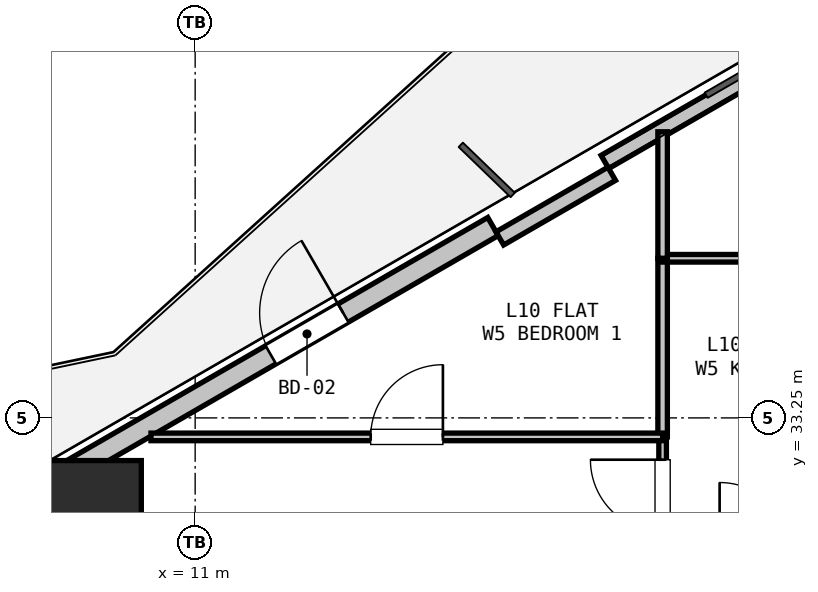
"""IFC4 building model, lengths in metres.
Left out: names, types, materials, properties, quantities, classifications, styles, units other than length and angle.
Written with IfcOpenShell. Run it as: python <this file> out.ifc"""

import sys

from ifc_helpers import new_model, si_unit, direction, frame, frame_2d, origin, origin_2d, place, context, subcontext, project, spatial, rectangle, hollow_rectangle, extrude, element, fill, save


model = new_model("IFC4")
c1 = context("Model", 3, precision=1e-05, world=origin(), true_north=direction((0.0, 1.0)))
c2 = subcontext(c1, "Body", "Model", "MODEL_VIEW")
j1 = project(units=[si_unit("LENGTHUNIT", "METRE"), si_unit("PLANEANGLEUNIT", "RADIAN")], contexts=[c1])
p1 = place(None, origin())
s1 = spatial("IfcSite", under=j1, at=p1, CompositionType="ELEMENT")
p2 = place(p1, origin())
s2 = spatial("IfcBuilding", under=s1, at=p2, CompositionType="ELEMENT")
p3 = place(p2, frame((0.0, 0.0, 39.0)))
s3 = spatial("IfcBuildingStorey", under=s2, at=p3, CompositionType="ELEMENT", Elevation=39.0)
p4 = place(p3, frame((9.617, 32.014, 0.0), z_axis=(0.0, 0.0, 1.0), x_axis=(1.0, 0.0, 0.0)))
e1 = element("IfcColumn", 1, at=p4, inside=s3, PredefinedType="COLUMN", context=c2, shape_type="SweptSolid", body=[
    extrude(hollow_rectangle(XDim=1.35, YDim=1.35, WallThickness=0.036, at=origin_2d()), origin(), (0.0, 0.0, 1.0), 3.3),
])
p5 = place(p3, frame((3.943, 29.431, 0.0), z_axis=(0.0, 0.0, 1.0), x_axis=(0.866027105532, 0.499997052475, 0.0)))
e2 = element("IfcWall", 2, at=p5, inside=s3, PredefinedType="SOLIDWALL", context=c2, shape_type="SweptSolid", body=[
    extrude(rectangle(XDim=12.673, YDim=0.275, at=frame_2d((6.336, 0.0))), origin(), (0.0, 0.0, 1.0), 2.66),
])
p6 = place(p5, frame((9.298, 0.0, 0.0)))
e3 = element("IfcOpeningElement", 3, at=p6, cuts=e2, PredefinedType="OPENING", context=c2, shape_type="SweptSolid", body=[
    extrude(rectangle(XDim=1.1, YDim=2.1, at=frame_2d((0.55, 1.05))), frame((0.0, 0.147, 0.0), z_axis=(0.0, -1.0, 0.0), x_axis=(1.0, 0.0, 0.0)), (0.0, 0.0, 1.0), 0.295),
])
p7 = place(p3, frame((16.39, 36.617, 0.0), z_axis=(0.0, 0.0, 1.0), x_axis=(0.866027351828, 0.499996625875, 0.0)))
e4 = element("IfcWall", 4, at=p7, inside=s3, PredefinedType="PARAPET", context=c2, shape_type="SweptSolid", body=[
    extrude(rectangle(XDim=11.973, YDim=0.2, at=frame_2d((5.987, 0.0))), origin(), (0.0, 0.0, 1.0), 0.2),
])
p8 = place(p3, frame((15.008, 35.611, 0.0), z_axis=(0.0, 0.0, 1.0), x_axis=(0.86605165483, 0.499954529098, 0.0)))
e5 = element("IfcWall", 5, at=p8, inside=s3, PredefinedType="PARAPET", context=c2, shape_type="SweptSolid", body=[
    extrude(rectangle(XDim=1.7, YDim=0.2, at=frame_2d((0.85, 0.0))), origin(), (0.0, 0.0, 1.0), 2.66),
])
p9 = place(p3, frame((17.15, 31.45, 0.0), z_axis=(0.0, 0.0, 1.0), x_axis=(0.0, 1.0, 0.0)))
e6 = element("IfcWall", 6, at=p9, inside=s3, PredefinedType="PARTITIONING", context=c2, shape_type="SweptSolid", body=[
    extrude(rectangle(XDim=1.55, YDim=0.1, at=frame_2d((0.775, 0.0))), origin(), (0.0, 0.0, 1.0), 2.337),
])
p10 = place(p9, frame((0.3, 0.0, 0.0)))
e7 = element("IfcOpeningElement", 7, at=p10, cuts=e6, PredefinedType="OPENING", context=c2, shape_type="SweptSolid", body=[
    extrude(rectangle(XDim=0.95, YDim=2.1, at=frame_2d((0.475, 1.05))), frame((0.0, 0.06, 0.0), z_axis=(0.0, -1.0, 0.0), x_axis=(1.0, 0.0, 0.0)), (0.0, 0.0, 1.0), 0.12),
])
p11 = place(p3, frame((17.15, 33.0, 0.0), z_axis=(0.0, 0.0, 1.0), x_axis=(0.0, 1.0, 0.0)))
e8 = element("IfcWall", 8, at=p11, inside=s3, PredefinedType="PARTITIONING", context=c2, shape_type="SweptSolid", body=[
    extrude(rectangle(XDim=2.35, YDim=0.125, at=frame_2d((1.175, 0.0))), origin(), (0.0, 0.0, 1.0), 3.04),
])
p12 = place(p3, frame((17.15, 35.35, 0.0), z_axis=(0.0, 0.0, 1.0), x_axis=(1.0, 0.0, 0.0)))
e9 = element("IfcWall", 9, at=p12, inside=s3, PredefinedType="PARTITIONING", context=c2, shape_type="SweptSolid", body=[
    extrude(rectangle(XDim=2.45, YDim=0.1, at=frame_2d((1.225, 0.0))), origin(), (0.0, 0.0, 1.0), 3.04),
])
p13 = place(p3, frame((10.419, 33.0, 0.0), z_axis=(0.0, 0.0, 1.0), x_axis=(1.0, 0.0, 0.0)))
e10 = element("IfcWall", 10, at=p13, inside=s3, PredefinedType="PARTITIONING", context=c2, shape_type="SweptSolid", body=[
    extrude(rectangle(XDim=6.731, YDim=0.1, at=frame_2d((3.365, 0.0))), origin(), (0.0, 0.0, 1.0), 2.365),
])
p14 = place(p13, frame((2.89, 0.0, 0.0)))
e11 = element("IfcOpeningElement", 11, at=p14, cuts=e10, PredefinedType="OPENING", context=c2, shape_type="SweptSolid", body=[
    extrude(rectangle(XDim=0.95, YDim=2.1, at=frame_2d((0.475, 1.05))), frame((0.0, 0.06, 0.0), z_axis=(0.0, -1.0, 0.0), x_axis=(1.0, 0.0, 0.0)), (0.0, 0.0, 1.0), 0.12),
])
p15 = place(p3, frame((17.15, 37.014, 0.0), z_axis=(0.0, 0.0, 1.0), x_axis=(0.0, -1.0, 0.0)))
e12 = element("IfcWall", 12, at=p15, inside=s3, PredefinedType="PARTITIONING", context=c2, shape_type="SweptSolid", body=[
    extrude(rectangle(XDim=1.664, YDim=0.125, at=frame_2d((0.832, 0.0))), origin(), (0.0, 0.0, 1.0), 2.365),
])
p16 = place(p6, origin())
e13 = element("IfcDoor", 13, at=p16, inside=s3, OperationType="SINGLE_SWING_RIGHT", PredefinedType="DOOR", context=c2, shape_type="SweptSolid", body=[
    extrude(rectangle(XDim=1.1, YDim=2.1, at=frame_2d((0.55, 1.05))), frame((0.0, 0.025, 0.0), z_axis=(0.0, -1.0, 0.0), x_axis=(1.0, 0.0, 0.0)), (0.0, 0.0, 1.0), 0.05),
])
fill(e3, e13)
p17 = place(p10, origin())
e14 = element("IfcDoor", 14, at=p17, inside=s3, OperationType="SINGLE_SWING_RIGHT", PredefinedType="DOOR", context=c2, shape_type="SweptSolid", body=[
    extrude(rectangle(XDim=0.95, YDim=2.1, at=frame_2d((0.475, 1.05))), frame((0.0, 0.025, 0.0), z_axis=(0.0, -1.0, 0.0), x_axis=(1.0, 0.0, 0.0)), (0.0, 0.0, 1.0), 0.05),
])
fill(e7, e14)
p18 = place(p14, origin())
e15 = element("IfcDoor", 15, at=p18, inside=s3, OperationType="SINGLE_SWING_RIGHT", PredefinedType="DOOR", context=c2, shape_type="SweptSolid", body=[
    extrude(rectangle(XDim=0.95, YDim=2.1, at=frame_2d((0.475, 1.05))), frame((0.0, 0.025, 0.0), z_axis=(0.0, -1.0, 0.0), x_axis=(1.0, 0.0, 0.0)), (0.0, 0.0, 1.0), 0.05),
])
fill(e11, e15)
save(model, sys.argv[1])
